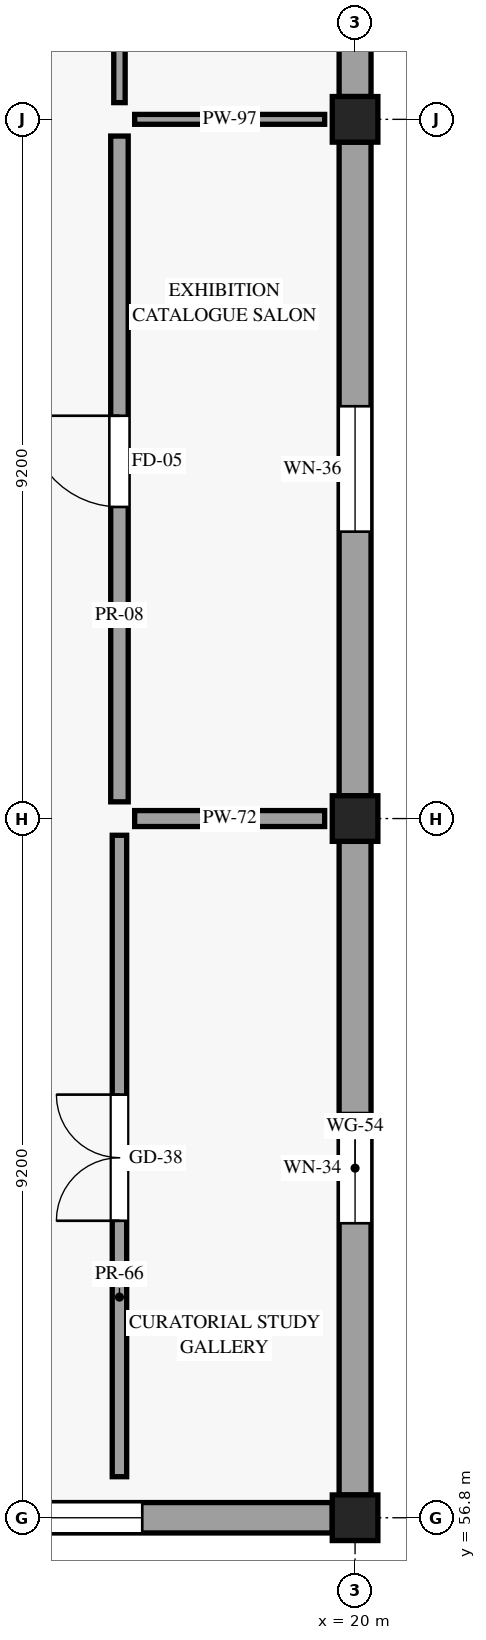
"""IFC4 building model, lengths in metres.
Left out: names, types, materials, properties, quantities, classifications, styles, units other than length and angle.
Written with IfcOpenShell. Run it as: python <this file> out.ifc"""

import sys

from ifc_helpers import new_model, si_unit, direction, frame, frame_2d, origin, origin_2d, place, context, subcontext, project, spatial, rectangle, extrude, element, fill, save


model = new_model("IFC4")
c1 = context("Model", 3, precision=1e-05, world=origin(), true_north=direction((0.0, 1.0)))
c2 = subcontext(c1, "Body", "Model", "MODEL_VIEW")
j1 = project(units=[si_unit("LENGTHUNIT", "METRE"), si_unit("PLANEANGLEUNIT", "RADIAN")], contexts=[c1])
p1 = place(None, origin())
s1 = spatial("IfcSite", under=j1, at=p1, CompositionType="ELEMENT")
p2 = place(p1, origin())
s2 = spatial("IfcBuilding", under=s1, at=p2, CompositionType="ELEMENT")
p3 = place(p2, origin())
s3 = spatial("IfcBuildingStorey", under=s2, at=p3, CompositionType="ELEMENT", Elevation=0.0)
for number, where, z_axis, x_axis in (
    (1, (20.0, 56.8, 0.0), (0.0, 0.0, 1.0), (1.0, 0.0, 0.0)),
    (2, (20.0, 66.0, 0.0), (0.0, 0.0, 1.0), (1.0, 0.0, 0.0)),
    (3, (20.0, 75.2, 0.0), (0.0, 0.0, 1.0), (1.0, 0.0, 0.0)),
):
    element("IfcColumn", number, at=place(p3, frame(where, z_axis=z_axis, x_axis=x_axis)), inside=s3, PredefinedType="COLUMN", context=c2, shape_type="SweptSolid", body=[
        extrude(rectangle(XDim=0.6, YDim=0.6, at=origin_2d()), origin(), (0.0, 0.0, 1.0), 5.4),
    ])
p4 = place(p3, frame((11.3, 56.8, 0.0), z_axis=(0.0, 0.0, 1.0), x_axis=(1.0, 0.0, 0.0)))
e4 = element("IfcWall", 4, at=p4, inside=s3, PredefinedType="STANDARD", context=c2, shape_type="SweptSolid", body=[
    extrude(rectangle(XDim=8.4, YDim=0.4, at=frame_2d((4.2, 0.0))), origin(), (0.0, 0.0, 1.0), 4.605),
])
p5 = place(p4, frame((5.9, 0.0, 0.85), z_axis=(0.0, 0.0, 1.0), x_axis=(-1.0, 0.0, 0.0)))
e5 = element("IfcOpeningElement", 5, at=p5, cuts=e4, PredefinedType="OPENING", context=c2, shape_type="SweptSolid", body=[
    extrude(rectangle(XDim=3.4, YDim=2.4, at=frame_2d((1.7, 1.2))), frame((0.0, 0.21, 0.0), z_axis=(0.0, -1.0, 0.0), x_axis=(1.0, 0.0, 0.0)), (0.0, 0.0, 1.0), 0.42),
])
p6 = place(p3, frame((20.0, 57.1, 0.0), z_axis=(0.0, 0.0, 1.0), x_axis=(0.0, 1.0, 0.0)))
e6 = element("IfcWall", 6, at=p6, inside=s3, PredefinedType="STANDARD", context=c2, shape_type="SweptSolid", body=[
    extrude(rectangle(XDim=8.6, YDim=0.42, at=frame_2d((4.3, 0.0))), origin(), (0.0, 0.0, 1.0), 4.605),
])
p7 = place(p6, frame((5.025, 0.0, 0.85), z_axis=(0.0, 0.0, 1.0), x_axis=(-1.0, 0.0, 0.0)))
e7 = element("IfcOpeningElement", 7, at=p7, cuts=e6, PredefinedType="OPENING", context=c2, shape_type="SweptSolid", body=[
    extrude(rectangle(XDim=1.45, YDim=1.85, at=frame_2d((0.725, 0.925))), frame((0.0, 0.22, 0.0), z_axis=(0.0, -1.0, 0.0), x_axis=(1.0, 0.0, 0.0)), (0.0, 0.0, 1.0), 0.44),
])
p8 = place(p3, frame((20.0, 66.3, 0.0), z_axis=(0.0, 0.0, 1.0), x_axis=(0.0, 1.0, 0.0)))
e8 = element("IfcWall", 8, at=p8, inside=s3, PredefinedType="STANDARD", context=c2, shape_type="SweptSolid", body=[
    extrude(rectangle(XDim=8.6, YDim=0.42, at=frame_2d((4.3, 0.0))), origin(), (0.0, 0.0, 1.0), 4.605),
])
p9 = place(p8, frame((5.125, 0.0, 0.85), z_axis=(0.0, 0.0, 1.0), x_axis=(-1.0, 0.0, 0.0)))
e9 = element("IfcOpeningElement", 9, at=p9, cuts=e8, PredefinedType="OPENING", context=c2, shape_type="SweptSolid", body=[
    extrude(rectangle(XDim=1.65, YDim=2.0, at=frame_2d((0.825, 1.0))), frame((0.0, 0.22, 0.0), z_axis=(0.0, -1.0, 0.0), x_axis=(1.0, 0.0, 0.0)), (0.0, 0.0, 1.0), 0.44),
])
p10 = place(p3, frame((20.0, 75.5, 0.0), z_axis=(0.0, 0.0, 1.0), x_axis=(0.0, 1.0, 0.0)))
e10 = element("IfcWall", 10, at=p10, inside=s3, PredefinedType="STANDARD", context=c2, shape_type="SweptSolid", body=[
    extrude(rectangle(XDim=8.6, YDim=0.42, at=frame_2d((4.3, 0.0))), origin(), (0.0, 0.0, 1.0), 4.605),
])
p11 = place(p10, frame((5.225, 0.0, 0.85), z_axis=(0.0, 0.0, 1.0), x_axis=(-1.0, 0.0, 0.0)))
e11 = element("IfcOpeningElement", 11, at=p11, cuts=e10, PredefinedType="OPENING", context=c2, shape_type="SweptSolid", body=[
    extrude(rectangle(XDim=1.85, YDim=2.1, at=frame_2d((0.925, 1.05))), frame((0.0, 0.22, 0.0), z_axis=(0.0, -1.0, 0.0), x_axis=(1.0, 0.0, 0.0)), (0.0, 0.0, 1.0), 0.44),
])
p12 = place(p3, frame((16.9, 57.34, 0.0), z_axis=(0.0, 0.0, 1.0), x_axis=(0.0, 1.0, 0.0)))
e12 = element("IfcWall", 12, at=p12, inside=s3, PredefinedType="PARTITIONING", context=c2, shape_type="SweptSolid", body=[
    extrude(rectangle(XDim=8.44, YDim=0.19, at=frame_2d((4.22, 0.0))), origin(), (0.0, 0.0, 1.0), 4.605),
])
p13 = place(p12, frame((3.368, 0.0, 0.0)))
e13 = element("IfcOpeningElement", 13, at=p13, cuts=e12, PredefinedType="OPENING", context=c2, shape_type="SweptSolid", body=[
    extrude(rectangle(XDim=1.66, YDim=2.42, at=frame_2d((0.83, 1.21))), frame((0.0, 0.105, 0.0), z_axis=(0.0, -1.0, 0.0), x_axis=(1.0, 0.0, 0.0)), (0.0, 0.0, 1.0), 0.21),
])
p14 = place(p3, frame((17.1, 66.0, 0.0), z_axis=(0.0, 0.0, 1.0), x_axis=(1.0, 0.0, 0.0)))
e14 = element("IfcWall", 14, at=p14, inside=s3, PredefinedType="PARTITIONING", context=c2, shape_type="SweptSolid", body=[
    extrude(rectangle(XDim=2.5, YDim=0.21, at=frame_2d((1.25, 0.0))), origin(), (0.0, 0.0, 1.0), 4.605),
])
p15 = place(p3, frame((16.9, 66.22, 0.0), z_axis=(0.0, 0.0, 1.0), x_axis=(0.0, 1.0, 0.0)))
e15 = element("IfcWall", 15, at=p15, inside=s3, PredefinedType="PARTITIONING", context=c2, shape_type="SweptSolid", body=[
    extrude(rectangle(XDim=8.76, YDim=0.23, at=frame_2d((4.38, 0.0))), origin(), (0.0, 0.0, 1.0), 4.605),
])
p16 = place(p15, frame((3.88, 0.0, 0.0)))
e16 = element("IfcOpeningElement", 16, at=p16, cuts=e15, PredefinedType="OPENING", context=c2, shape_type="SweptSolid", body=[
    extrude(rectangle(XDim=1.2, YDim=2.3, at=frame_2d((0.6, 1.15))), frame((0.0, 0.125, 0.0), z_axis=(0.0, -1.0, 0.0), x_axis=(1.0, 0.0, 0.0)), (0.0, 0.0, 1.0), 0.25),
])
p17 = place(p3, frame((17.1, 75.2, 0.0), z_axis=(0.0, 0.0, 1.0), x_axis=(1.0, 0.0, 0.0)))
e17 = element("IfcWall", 17, at=p17, inside=s3, PredefinedType="PARTITIONING", context=c2, shape_type="SweptSolid", body=[
    extrude(rectangle(XDim=2.5, YDim=0.13, at=frame_2d((1.25, 0.0))), origin(), (0.0, 0.0, 1.0), 4.605),
])
p18 = place(p3, frame((16.9, 75.42, 0.0), z_axis=(0.0, 0.0, 1.0), x_axis=(0.0, 1.0, 0.0)))
e18 = element("IfcWall", 18, at=p18, inside=s3, PredefinedType="PARTITIONING", context=c2, shape_type="SweptSolid", body=[
    extrude(rectangle(XDim=17.96, YDim=0.15, at=frame_2d((8.98, 0.0))), origin(), (0.0, 0.0, 1.0), 4.605),
])
p19 = place(p18, frame((3.936, 0.0, 0.0)))
e19 = element("IfcOpeningElement", 19, at=p19, cuts=e18, PredefinedType="OPENING", context=c2, shape_type="SweptSolid", body=[
    extrude(rectangle(XDim=0.92, YDim=2.12, at=frame_2d((0.46, 1.06))), frame((0.0, 0.085, 0.0), z_axis=(0.0, -1.0, 0.0), x_axis=(1.0, 0.0, 0.0)), (0.0, 0.0, 1.0), 0.17),
])
p20 = place(p5, origin())
e20 = element("IfcWindow", 20, at=p20, inside=s3, PartitioningType="SINGLE_PANEL", PredefinedType="WINDOW", context=c2, shape_type="SweptSolid", body=[
    extrude(rectangle(XDim=3.4, YDim=2.4, at=frame_2d((1.7, 1.2))), frame((0.0, 0.03, 0.0), z_axis=(0.0, -1.0, 0.0), x_axis=(1.0, 0.0, 0.0)), (0.0, 0.0, 1.0), 0.06),
])
fill(e5, e20)
p21 = place(p7, origin())
e21 = element("IfcWindow", 21, at=p21, inside=s3, PartitioningType="SINGLE_PANEL", PredefinedType="WINDOW", context=c2, shape_type="SweptSolid", body=[
    extrude(rectangle(XDim=1.45, YDim=1.85, at=frame_2d((0.725, 0.925))), frame((0.0, 0.03, 0.0), z_axis=(0.0, -1.0, 0.0), x_axis=(1.0, 0.0, 0.0)), (0.0, 0.0, 1.0), 0.06),
])
fill(e7, e21)
p22 = place(p9, origin())
e22 = element("IfcWindow", 22, at=p22, inside=s3, PartitioningType="SINGLE_PANEL", PredefinedType="WINDOW", context=c2, shape_type="SweptSolid", body=[
    extrude(rectangle(XDim=1.65, YDim=2.0, at=frame_2d((0.825, 1.0))), frame((0.0, 0.03, 0.0), z_axis=(0.0, -1.0, 0.0), x_axis=(1.0, 0.0, 0.0)), (0.0, 0.0, 1.0), 0.06),
])
fill(e9, e22)
p23 = place(p13, origin())
e23 = element("IfcDoor", 23, at=p23, inside=s3, OperationType="DOUBLE_DOOR_SINGLE_SWING", PredefinedType="DOOR", context=c2, shape_type="SweptSolid", body=[
    extrude(rectangle(XDim=1.66, YDim=2.42, at=frame_2d((0.83, 1.21))), frame((0.0, 0.025, 0.0), z_axis=(0.0, -1.0, 0.0), x_axis=(1.0, 0.0, 0.0)), (0.0, 0.0, 1.0), 0.05),
])
fill(e13, e23)
p24 = place(p16, origin())
e24 = element("IfcDoor", 24, at=p24, inside=s3, OperationType="SINGLE_SWING_RIGHT", PredefinedType="DOOR", context=c2, shape_type="SweptSolid", body=[
    extrude(rectangle(XDim=1.2, YDim=2.3, at=frame_2d((0.6, 1.15))), frame((0.0, 0.025, 0.0), z_axis=(0.0, -1.0, 0.0), x_axis=(1.0, 0.0, 0.0)), (0.0, 0.0, 1.0), 0.05),
])
fill(e16, e24)
save(model, sys.argv[1])
